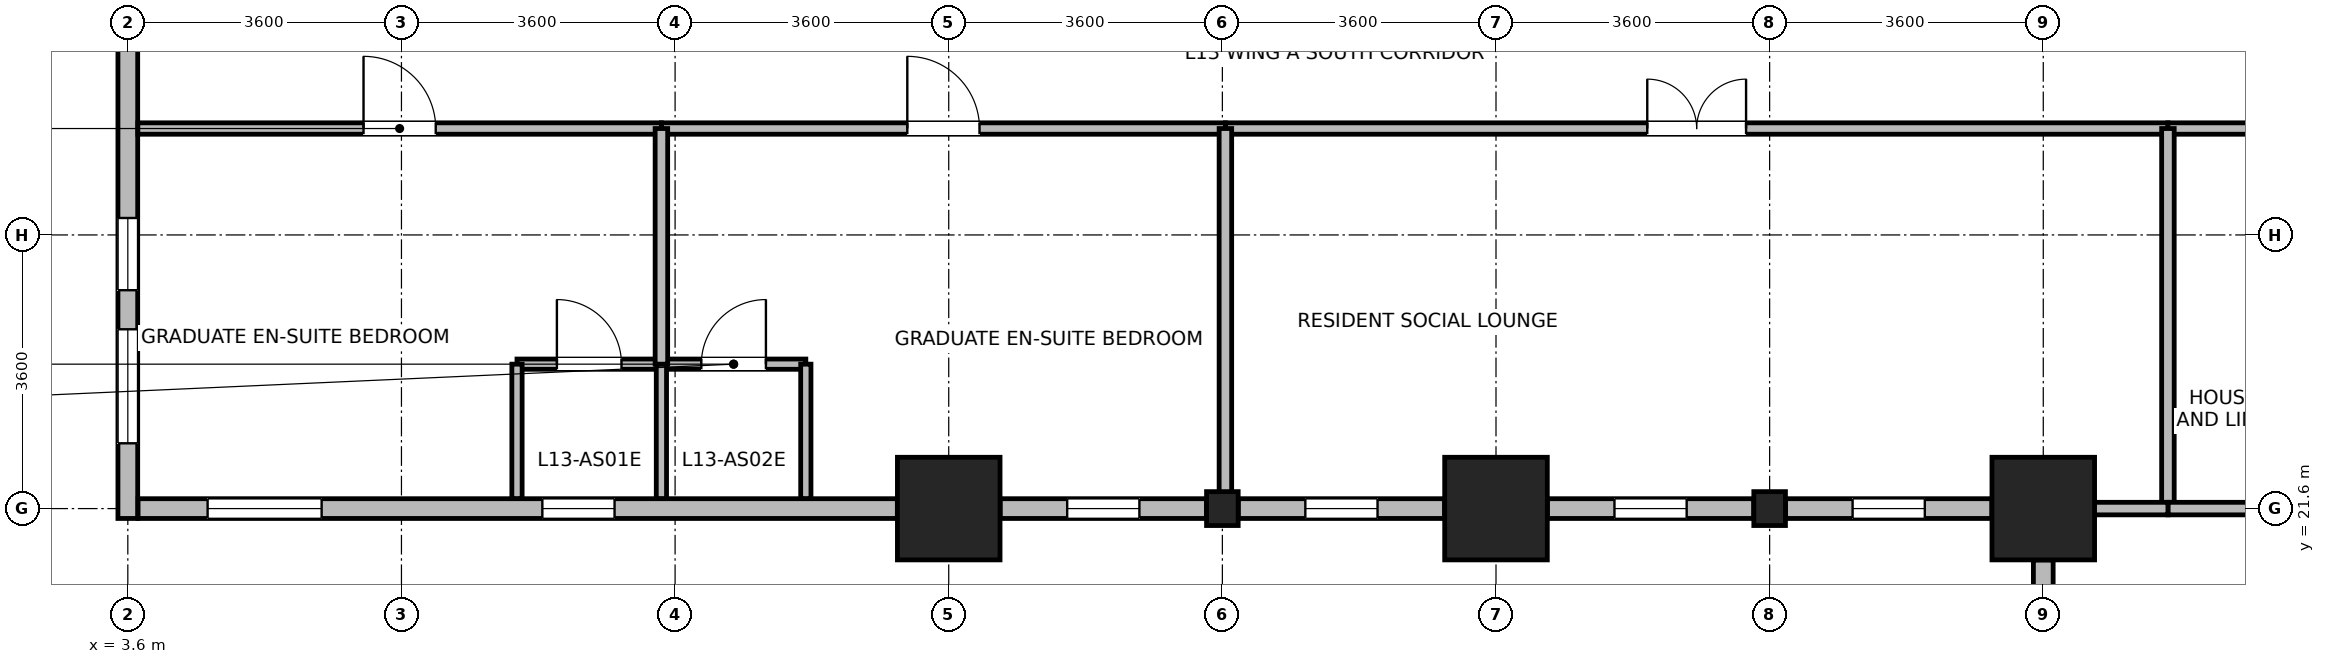
"""IFC4 building model, lengths in metres.
Left out: names, types, materials, properties, quantities, classifications, styles, units other than length and angle.
Written with IfcOpenShell. Run it as: python <this file> out.ifc"""

import sys

from ifc_helpers import new_model, si_unit, direction, frame, frame_2d, origin, origin_2d, place, context, subcontext, project, spatial, rectangle, i_section, extrude, source, transform, mapped, element, fill, save


model = new_model("IFC4")
c1 = context("Model", 3, precision=1e-05, world=origin(), true_north=direction((0.0, 1.0)))
c2 = subcontext(c1, "Body", "Model", "MODEL_VIEW")
j1 = project(units=[si_unit("LENGTHUNIT", "METRE"), si_unit("PLANEANGLEUNIT", "RADIAN")], contexts=[c1])
p1 = place(None, origin())
s1 = spatial("IfcSite", under=j1, at=p1, CompositionType="ELEMENT")
p2 = place(p1, origin())
s2 = spatial("IfcBuilding", under=s1, at=p2, CompositionType="ELEMENT")
p3 = place(p2, frame((0.0, 0.0, 54.9)))
s3 = spatial("IfcBuildingStorey", under=s2, at=p3, CompositionType="ELEMENT", Elevation=54.9)
m1 = source(origin(), c2, "Body", "SweptSolid", [
    extrude(rectangle(XDim=1.35, YDim=1.35, at=origin_2d()), origin(), (0.0, 0.0, 1.0), 3.7),
])
for number, where, z_axis, x_axis in (
    (1, (14.4, 21.6, 0.0), (0.0, 0.0, 1.0), (1.0, 0.0, 0.0)),
    (2, (21.6, 21.6, 0.0), (0.0, 0.0, 1.0), (1.0, 0.0, 0.0)),
    (3, (28.8, 21.6, 0.0), (0.0, 0.0, 1.0), (1.0, 0.0, 0.0)),
):
    element("IfcColumn", number, at=place(p3, frame(where, z_axis=z_axis, x_axis=x_axis)), inside=s3, PredefinedType="COLUMN", context=c2, shape_type="MappedRepresentation", body=[
        mapped(m1, transform((0.0, 0.0, 0.0), x_axis=(1.0, 0.0, 0.0), y_axis=(0.0, 1.0, 0.0), z_axis=(0.0, 0.0, 1.0), scale=1.0)),
    ])
m2 = source(origin(), c2, "Body", "SweptSolid", [
    extrude(i_section(OverallWidth=0.416, OverallDepth=0.446, WebThickness=0.029, FlangeThickness=0.04, FilletRadius=0.015, at=origin_2d()), origin(), (0.0, 0.0, 1.0), 3.7),
])
for number, where, z_axis, x_axis in (
    (4, (18.0, 21.6, 0.0), (0.0, 0.0, 1.0), (1.0, 0.0, 0.0)),
    (5, (25.2, 21.6, 0.0), (0.0, 0.0, 1.0), (1.0, 0.0, 0.0)),
):
    element("IfcColumn", number, at=place(p3, frame(where, z_axis=z_axis, x_axis=x_axis)), inside=s3, PredefinedType="COLUMN", context=c2, shape_type="MappedRepresentation", body=[
        mapped(m2, transform((0.0, 0.0, 0.0), x_axis=(1.0, 0.0, 0.0), y_axis=(0.0, 1.0, 0.0), z_axis=(0.0, 0.0, 1.0), scale=1.0)),
    ])
p4 = place(p3, frame((3.6, 21.47, 0.0), z_axis=(0.0, 0.0, 1.0), x_axis=(0.0, 1.0, 0.0)))
e6 = element("IfcWall", 6, at=p4, inside=s3, PredefinedType="STANDARD", context=c2, shape_type="SweptSolid", body=[
    extrude(rectangle(XDim=6.956, YDim=0.26, at=frame_2d((3.478, 0.0))), origin(), (0.0, 0.0, 1.0), 3.43),
])
p5 = place(p4, frame((0.989, 0.0, 0.85)))
e7 = element("IfcOpeningElement", 7, at=p5, cuts=e6, PredefinedType="OPENING", context=c2, shape_type="SweptSolid", body=[
    extrude(rectangle(XDim=1.5, YDim=1.85, at=frame_2d((0.75, 0.925))), frame((0.0, 0.14, 0.0), z_axis=(0.0, -1.0, 0.0), x_axis=(1.0, 0.0, 0.0)), (0.0, 0.0, 1.0), 0.28),
])
p6 = place(p4, frame((3.003, 0.0, 0.85)))
e8 = element("IfcOpeningElement", 8, at=p6, cuts=e6, PredefinedType="OPENING", context=c2, shape_type="SweptSolid", body=[
    extrude(rectangle(XDim=0.95, YDim=1.75, at=frame_2d((0.475, 0.875))), frame((0.0, 0.14, 0.0), z_axis=(0.0, -1.0, 0.0), x_axis=(1.0, 0.0, 0.0)), (0.0, 0.0, 1.0), 0.28),
])
p7 = place(p3, frame((13.724, 21.6, 0.0), z_axis=(0.0, 0.0, 1.0), x_axis=(-1.0, 0.0, 0.0)))
e9 = element("IfcWall", 9, at=p7, inside=s3, PredefinedType="STANDARD", context=c2, shape_type="SweptSolid", body=[
    extrude(rectangle(XDim=9.989, YDim=0.26, at=frame_2d((4.995, 0.0))), origin(), (0.0, 0.0, 1.0), 3.43),
])
p8 = place(p7, frame((7.574, 0.0, 0.85)))
e10 = element("IfcOpeningElement", 10, at=p8, cuts=e9, PredefinedType="OPENING", context=c2, shape_type="SweptSolid", body=[
    extrude(rectangle(XDim=1.5, YDim=1.85, at=frame_2d((0.75, 0.925))), frame((0.0, 0.14, 0.0), z_axis=(0.0, -1.0, 0.0), x_axis=(1.0, 0.0, 0.0)), (0.0, 0.0, 1.0), 0.28),
])
p9 = place(p7, frame((3.72, 0.0, 0.85)))
e11 = element("IfcOpeningElement", 11, at=p9, cuts=e9, PredefinedType="OPENING", context=c2, shape_type="SweptSolid", body=[
    extrude(rectangle(XDim=0.95, YDim=1.75, at=frame_2d((0.475, 0.875))), frame((0.0, 0.14, 0.0), z_axis=(0.0, -1.0, 0.0), x_axis=(1.0, 0.0, 0.0)), (0.0, 0.0, 1.0), 0.28),
])
p10 = place(p3, frame((17.791, 21.6, 0.0), z_axis=(0.0, 0.0, 1.0), x_axis=(-1.0, 0.0, 0.0)))
e12 = element("IfcWall", 12, at=p10, inside=s3, PredefinedType="STANDARD", context=c2, shape_type="SweptSolid", body=[
    extrude(rectangle(XDim=2.715, YDim=0.26, at=frame_2d((1.357, 0.0))), origin(), (0.0, 0.0, 1.0), 2.93),
])
p11 = place(p10, frame((0.883, 0.0, 0.85)))
e13 = element("IfcOpeningElement", 13, at=p11, cuts=e12, PredefinedType="OPENING", context=c2, shape_type="SweptSolid", body=[
    extrude(rectangle(XDim=0.95, YDim=1.75, at=frame_2d((0.475, 0.875))), frame((0.0, 0.14, 0.0), z_axis=(0.0, -1.0, 0.0), x_axis=(1.0, 0.0, 0.0)), (0.0, 0.0, 1.0), 0.28),
])
p12 = place(p3, frame((20.924, 21.6, 0.0), z_axis=(0.0, 0.0, 1.0), x_axis=(-1.0, 0.0, 0.0)))
e14 = element("IfcWall", 14, at=p12, inside=s3, PredefinedType="STANDARD", context=c2, shape_type="SweptSolid", body=[
    extrude(rectangle(XDim=2.715, YDim=0.26, at=frame_2d((1.357, 0.0))), origin(), (0.0, 0.0, 1.0), 2.93),
])
p13 = place(p12, frame((0.883, 0.0, 0.85)))
e15 = element("IfcOpeningElement", 15, at=p13, cuts=e14, PredefinedType="OPENING", context=c2, shape_type="SweptSolid", body=[
    extrude(rectangle(XDim=0.95, YDim=1.75, at=frame_2d((0.475, 0.875))), frame((0.0, 0.14, 0.0), z_axis=(0.0, -1.0, 0.0), x_axis=(1.0, 0.0, 0.0)), (0.0, 0.0, 1.0), 0.28),
])
p14 = place(p3, frame((24.991, 21.6, 0.0), z_axis=(0.0, 0.0, 1.0), x_axis=(-1.0, 0.0, 0.0)))
e16 = element("IfcWall", 16, at=p14, inside=s3, PredefinedType="STANDARD", context=c2, shape_type="SweptSolid", body=[
    extrude(rectangle(XDim=2.715, YDim=0.26, at=frame_2d((1.357, 0.0))), origin(), (0.0, 0.0, 1.0), 2.93),
])
p15 = place(p14, frame((0.883, 0.0, 0.85)))
e17 = element("IfcOpeningElement", 17, at=p15, cuts=e16, PredefinedType="OPENING", context=c2, shape_type="SweptSolid", body=[
    extrude(rectangle(XDim=0.95, YDim=1.75, at=frame_2d((0.475, 0.875))), frame((0.0, 0.14, 0.0), z_axis=(0.0, -1.0, 0.0), x_axis=(1.0, 0.0, 0.0)), (0.0, 0.0, 1.0), 0.28),
])
p16 = place(p3, frame((28.124, 21.6, 0.0), z_axis=(0.0, 0.0, 1.0), x_axis=(-1.0, 0.0, 0.0)))
e18 = element("IfcWall", 18, at=p16, inside=s3, PredefinedType="STANDARD", context=c2, shape_type="SweptSolid", body=[
    extrude(rectangle(XDim=2.715, YDim=0.26, at=frame_2d((1.357, 0.0))), origin(), (0.0, 0.0, 1.0), 2.93),
])
p17 = place(p16, frame((0.883, 0.0, 0.85)))
e19 = element("IfcOpeningElement", 19, at=p17, cuts=e18, PredefinedType="OPENING", context=c2, shape_type="SweptSolid", body=[
    extrude(rectangle(XDim=0.95, YDim=1.75, at=frame_2d((0.475, 0.875))), frame((0.0, 0.14, 0.0), z_axis=(0.0, -1.0, 0.0), x_axis=(1.0, 0.0, 0.0)), (0.0, 0.0, 1.0), 0.28),
])
p18 = place(p3, frame((28.8, 1.67, 0.0), z_axis=(0.0, 0.0, 1.0), x_axis=(0.0, 1.0, 0.0)))
e20 = element("IfcWall", 20, at=p18, inside=s3, PredefinedType="STANDARD", context=c2, shape_type="SweptSolid", body=[
    extrude(rectangle(XDim=19.254, YDim=0.26, at=frame_2d((9.627, 0.0))), origin(), (0.0, 0.0, 1.0), 3.43),
])
p19 = place(p18, frame((0.854, 0.0, 0.85)))
e21 = element("IfcOpeningElement", 21, at=p19, cuts=e20, PredefinedType="OPENING", context=c2, shape_type="SweptSolid", body=[
    extrude(rectangle(XDim=1.5, YDim=1.85, at=frame_2d((0.75, 0.925))), frame((0.0, 0.14, 0.0), z_axis=(0.0, -1.0, 0.0), x_axis=(1.0, 0.0, 0.0)), (0.0, 0.0, 1.0), 0.28),
])
p20 = place(p18, frame((7.272, 0.0, 0.85)))
e22 = element("IfcOpeningElement", 22, at=p20, cuts=e20, PredefinedType="OPENING", context=c2, shape_type="SweptSolid", body=[
    extrude(rectangle(XDim=1.5, YDim=1.85, at=frame_2d((0.75, 0.925))), frame((0.0, 0.14, 0.0), z_axis=(0.0, -1.0, 0.0), x_axis=(1.0, 0.0, 0.0)), (0.0, 0.0, 1.0), 0.28),
])
p21 = place(p18, frame((10.481, 0.0, 0.85)))
e23 = element("IfcOpeningElement", 23, at=p21, cuts=e20, PredefinedType="OPENING", context=c2, shape_type="SweptSolid", body=[
    extrude(rectangle(XDim=1.5, YDim=1.85, at=frame_2d((0.75, 0.925))), frame((0.0, 0.14, 0.0), z_axis=(0.0, -1.0, 0.0), x_axis=(1.0, 0.0, 0.0)), (0.0, 0.0, 1.0), 0.28),
])
p22 = place(p18, frame((13.69, 0.0, 0.85)))
e24 = element("IfcOpeningElement", 24, at=p22, cuts=e20, PredefinedType="OPENING", context=c2, shape_type="SweptSolid", body=[
    extrude(rectangle(XDim=1.5, YDim=1.85, at=frame_2d((0.75, 0.925))), frame((0.0, 0.14, 0.0), z_axis=(0.0, -1.0, 0.0), x_axis=(1.0, 0.0, 0.0)), (0.0, 0.0, 1.0), 0.28),
])
p23 = place(p18, frame((16.899, 0.0, 0.85)))
e25 = element("IfcOpeningElement", 25, at=p23, cuts=e20, PredefinedType="OPENING", context=c2, shape_type="SweptSolid", body=[
    extrude(rectangle(XDim=1.5, YDim=1.85, at=frame_2d((0.75, 0.925))), frame((0.0, 0.14, 0.0), z_axis=(0.0, -1.0, 0.0), x_axis=(1.0, 0.0, 0.0)), (0.0, 0.0, 1.0), 0.28),
])
p24 = place(p3, frame((10.62, 23.5, 0.0), z_axis=(0.0, 0.0, 1.0), x_axis=(1.0, 0.0, 0.0)))
e26 = element("IfcWall", 26, at=p24, inside=s3, PredefinedType="PARTITIONING", context=c2, shape_type="SweptSolid", body=[
    extrude(rectangle(XDim=1.9, YDim=0.135, at=frame_2d((0.95, 0.0))), origin(), (0.0, 0.0, 1.0), 3.43),
])
p25 = place(p24, frame((0.525, 0.0, 0.0)))
e27 = element("IfcOpeningElement", 27, at=p25, cuts=e26, PredefinedType="OPENING", context=c2, shape_type="SweptSolid", body=[
    extrude(rectangle(XDim=0.85, YDim=2.04, at=frame_2d((0.425, 1.02))), frame((0.0, 0.078, 0.0), z_axis=(0.0, -1.0, 0.0), x_axis=(1.0, 0.0, 0.0)), (0.0, 0.0, 1.0), 0.155),
])
p26 = place(p3, frame((8.72, 23.5, 0.0), z_axis=(0.0, 0.0, 1.0), x_axis=(1.0, 0.0, 0.0)))
e28 = element("IfcWall", 28, at=p26, inside=s3, PredefinedType="PARTITIONING", context=c2, shape_type="SweptSolid", body=[
    extrude(rectangle(XDim=1.9, YDim=0.135, at=frame_2d((0.95, 0.0))), origin(), (0.0, 0.0, 1.0), 3.43),
])
p27 = place(p26, frame((0.525, 0.0, 0.0)))
e29 = element("IfcOpeningElement", 29, at=p27, cuts=e28, PredefinedType="OPENING", context=c2, shape_type="SweptSolid", body=[
    extrude(rectangle(XDim=0.85, YDim=2.04, at=frame_2d((0.425, 1.02))), frame((0.0, 0.078, 0.0), z_axis=(0.0, -1.0, 0.0), x_axis=(1.0, 0.0, 0.0)), (0.0, 0.0, 1.0), 0.155),
])
for number, where, z_axis, x_axis in (
    (30, (8.72, 21.732, 0.0), (0.0, 0.0, 1.0), (0.0, 1.0, 0.0)),
    (31, (10.62, 21.732, 0.0), (0.0, 0.0, 1.0), (0.0, 1.0, 0.0)),
    (32, (12.52, 21.732, 0.0), (0.0, 0.0, 1.0), (0.0, 1.0, 0.0)),
):
    element("IfcWall", number, at=place(p3, frame(where, z_axis=z_axis, x_axis=x_axis)), inside=s3, PredefinedType="PARTITIONING", context=c2, shape_type="SweptSolid", body=[
        extrude(rectangle(XDim=1.768, YDim=0.135, at=frame_2d((0.884, 0.0))), origin(), (0.0, 0.0, 1.0), 3.43),
    ])
p28 = place(p3, frame((18.04, 26.6, 0.0), z_axis=(0.0, 0.0, 1.0), x_axis=(1.0, 0.0, 0.0)))
e33 = element("IfcWall", 33, at=p28, inside=s3, PredefinedType="PARTITIONING", context=c2, shape_type="SweptSolid", body=[
    extrude(rectangle(XDim=12.4, YDim=0.15, at=frame_2d((6.2, 0.0))), origin(), (0.0, 0.0, 1.0), 3.43),
])
p29 = place(p28, frame((5.55, 0.0, 0.0)))
e34 = element("IfcOpeningElement", 34, at=p29, cuts=e33, PredefinedType="OPENING", context=c2, shape_type="SweptSolid", body=[
    extrude(rectangle(XDim=1.3, YDim=2.12, at=frame_2d((0.65, 1.06))), frame((0.0, 0.085, 0.0), z_axis=(0.0, -1.0, 0.0), x_axis=(1.0, 0.0, 0.0)), (0.0, 0.0, 1.0), 0.17),
])
p30 = place(p3, frame((10.62, 26.6, 0.0), z_axis=(0.0, 0.0, 1.0), x_axis=(1.0, 0.0, 0.0)))
e35 = element("IfcWall", 35, at=p30, inside=s3, PredefinedType="PARTITIONING", context=c2, shape_type="SweptSolid", body=[
    extrude(rectangle(XDim=7.42, YDim=0.15, at=frame_2d((3.71, 0.0))), origin(), (0.0, 0.0, 1.0), 3.43),
])
p31 = place(p30, frame((3.235, 0.0, 0.0)))
e36 = element("IfcOpeningElement", 36, at=p31, cuts=e35, PredefinedType="OPENING", context=c2, shape_type="SweptSolid", body=[
    extrude(rectangle(XDim=0.95, YDim=2.1, at=frame_2d((0.475, 1.05))), frame((0.0, 0.085, 0.0), z_axis=(0.0, -1.0, 0.0), x_axis=(1.0, 0.0, 0.0)), (0.0, 0.0, 1.0), 0.17),
])
p32 = place(p3, frame((3.732, 26.6, 0.0), z_axis=(0.0, 0.0, 1.0), x_axis=(1.0, 0.0, 0.0)))
e37 = element("IfcWall", 37, at=p32, inside=s3, PredefinedType="PARTITIONING", context=c2, shape_type="SweptSolid", body=[
    extrude(rectangle(XDim=6.888, YDim=0.15, at=frame_2d((3.444, 0.0))), origin(), (0.0, 0.0, 1.0), 3.43),
])
p33 = place(p32, frame((2.969, 0.0, 0.0)))
e38 = element("IfcOpeningElement", 38, at=p33, cuts=e37, PredefinedType="OPENING", context=c2, shape_type="SweptSolid", body=[
    extrude(rectangle(XDim=0.95, YDim=2.1, at=frame_2d((0.475, 1.05))), frame((0.0, 0.085, 0.0), z_axis=(0.0, -1.0, 0.0), x_axis=(1.0, 0.0, 0.0)), (0.0, 0.0, 1.0), 0.17),
])
p34 = place(p3, frame((30.44, 26.6, 0.0), z_axis=(0.0, 0.0, 1.0), x_axis=(1.0, 0.0, 0.0)))
e39 = element("IfcWall", 39, at=p34, inside=s3, PredefinedType="PARTITIONING", context=c2, shape_type="SweptSolid", body=[
    extrude(rectangle(XDim=2.92, YDim=0.15, at=frame_2d((1.46, 0.0))), origin(), (0.0, 0.0, 1.0), 3.43),
])
p35 = place(p3, frame((18.04, 21.732, 0.0), z_axis=(0.0, 0.0, 1.0), x_axis=(0.0, 1.0, 0.0)))
e40 = element("IfcWall", 40, at=p35, inside=s3, PredefinedType="PARTITIONING", context=c2, shape_type="SweptSolid", body=[
    extrude(rectangle(XDim=4.868, YDim=0.165, at=frame_2d((2.434, 0.0))), origin(), (0.0, 0.0, 1.0), 3.07),
])
p36 = place(p3, frame((30.44, 21.6, 0.0), z_axis=(0.0, 0.0, 1.0), x_axis=(0.0, 1.0, 0.0)))
e41 = element("IfcWall", 41, at=p36, inside=s3, PredefinedType="PARTITIONING", context=c2, shape_type="SweptSolid", body=[
    extrude(rectangle(XDim=5.0, YDim=0.165, at=frame_2d((2.5, 0.0))), origin(), (0.0, 0.0, 1.0), 3.43),
])
p37 = place(p3, frame((10.62, 23.5, 0.0), z_axis=(0.0, 0.0, 1.0), x_axis=(0.0, 1.0, 0.0)))
e42 = element("IfcWall", 42, at=p37, inside=s3, PredefinedType="PARTITIONING", context=c2, shape_type="SweptSolid", body=[
    extrude(rectangle(XDim=3.1, YDim=0.165, at=frame_2d((1.55, 0.0))), origin(), (0.0, 0.0, 1.0), 3.43),
])
p38 = place(p3, frame((30.44, 21.6, 0.0), z_axis=(0.0, 0.0, 1.0), x_axis=(1.0, 0.0, 0.0)))
e43 = element("IfcWall", 43, at=p38, inside=s3, PredefinedType="PARTITIONING", context=c2, shape_type="SweptSolid", body=[
    extrude(rectangle(XDim=2.92, YDim=0.165, at=frame_2d((1.46, 0.0))), origin(), (0.0, 0.0, 1.0), 2.93),
])
p39 = place(p3, frame((28.932, 21.6, 0.0), z_axis=(0.0, 0.0, 1.0), x_axis=(1.0, 0.0, 0.0)))
e44 = element("IfcWall", 44, at=p39, inside=s3, PredefinedType="PARTITIONING", context=c2, shape_type="SweptSolid", body=[
    extrude(rectangle(XDim=1.508, YDim=0.165, at=frame_2d((0.754, 0.0))), origin(), (0.0, 0.0, 1.0), 2.93),
])
p40 = place(p5, origin())
e45 = element("IfcWindow", 45, at=p40, inside=s3, PartitioningType="SINGLE_PANEL", PredefinedType="WINDOW", context=c2, shape_type="SweptSolid", body=[
    extrude(rectangle(XDim=1.5, YDim=1.85, at=frame_2d((0.75, 0.925))), frame((0.0, 0.03, 0.0), z_axis=(0.0, -1.0, 0.0), x_axis=(1.0, 0.0, 0.0)), (0.0, 0.0, 1.0), 0.06),
])
fill(e7, e45)
p41 = place(p6, origin())
e46 = element("IfcWindow", 46, at=p41, inside=s3, PartitioningType="SINGLE_PANEL", PredefinedType="WINDOW", context=c2, shape_type="SweptSolid", body=[
    extrude(rectangle(XDim=0.95, YDim=1.75, at=frame_2d((0.475, 0.875))), frame((0.0, 0.03, 0.0), z_axis=(0.0, -1.0, 0.0), x_axis=(1.0, 0.0, 0.0)), (0.0, 0.0, 1.0), 0.06),
])
fill(e8, e46)
p42 = place(p8, origin())
e47 = element("IfcWindow", 47, at=p42, inside=s3, PartitioningType="SINGLE_PANEL", PredefinedType="WINDOW", context=c2, shape_type="SweptSolid", body=[
    extrude(rectangle(XDim=1.5, YDim=1.85, at=frame_2d((0.75, 0.925))), frame((0.0, 0.03, 0.0), z_axis=(0.0, -1.0, 0.0), x_axis=(1.0, 0.0, 0.0)), (0.0, 0.0, 1.0), 0.06),
])
fill(e10, e47)
p43 = place(p9, origin())
e48 = element("IfcWindow", 48, at=p43, inside=s3, PartitioningType="SINGLE_PANEL", PredefinedType="WINDOW", context=c2, shape_type="SweptSolid", body=[
    extrude(rectangle(XDim=0.95, YDim=1.75, at=frame_2d((0.475, 0.875))), frame((0.0, 0.03, 0.0), z_axis=(0.0, -1.0, 0.0), x_axis=(1.0, 0.0, 0.0)), (0.0, 0.0, 1.0), 0.06),
])
fill(e11, e48)
p44 = place(p11, origin())
e49 = element("IfcWindow", 49, at=p44, inside=s3, PartitioningType="SINGLE_PANEL", PredefinedType="WINDOW", context=c2, shape_type="SweptSolid", body=[
    extrude(rectangle(XDim=0.95, YDim=1.75, at=frame_2d((0.475, 0.875))), frame((0.0, 0.03, 0.0), z_axis=(0.0, -1.0, 0.0), x_axis=(1.0, 0.0, 0.0)), (0.0, 0.0, 1.0), 0.06),
])
fill(e13, e49)
p45 = place(p13, origin())
e50 = element("IfcWindow", 50, at=p45, inside=s3, PartitioningType="SINGLE_PANEL", PredefinedType="WINDOW", context=c2, shape_type="SweptSolid", body=[
    extrude(rectangle(XDim=0.95, YDim=1.75, at=frame_2d((0.475, 0.875))), frame((0.0, 0.03, 0.0), z_axis=(0.0, -1.0, 0.0), x_axis=(1.0, 0.0, 0.0)), (0.0, 0.0, 1.0), 0.06),
])
fill(e15, e50)
p46 = place(p15, origin())
e51 = element("IfcWindow", 51, at=p46, inside=s3, PartitioningType="SINGLE_PANEL", PredefinedType="WINDOW", context=c2, shape_type="SweptSolid", body=[
    extrude(rectangle(XDim=0.95, YDim=1.75, at=frame_2d((0.475, 0.875))), frame((0.0, 0.03, 0.0), z_axis=(0.0, -1.0, 0.0), x_axis=(1.0, 0.0, 0.0)), (0.0, 0.0, 1.0), 0.06),
])
fill(e17, e51)
p47 = place(p17, origin())
e52 = element("IfcWindow", 52, at=p47, inside=s3, PartitioningType="SINGLE_PANEL", PredefinedType="WINDOW", context=c2, shape_type="SweptSolid", body=[
    extrude(rectangle(XDim=0.95, YDim=1.75, at=frame_2d((0.475, 0.875))), frame((0.0, 0.03, 0.0), z_axis=(0.0, -1.0, 0.0), x_axis=(1.0, 0.0, 0.0)), (0.0, 0.0, 1.0), 0.06),
])
fill(e19, e52)
p48 = place(p25, origin())
e53 = element("IfcDoor", 53, at=p48, inside=s3, OperationType="SINGLE_SWING_RIGHT", PredefinedType="DOOR", context=c2, shape_type="SweptSolid", body=[
    extrude(rectangle(XDim=0.85, YDim=2.04, at=frame_2d((0.425, 1.02))), frame((0.0, 0.025, 0.0), z_axis=(0.0, -1.0, 0.0), x_axis=(1.0, 0.0, 0.0)), (0.0, 0.0, 1.0), 0.05),
])
fill(e27, e53)
p49 = place(p27, origin())
e54 = element("IfcDoor", 54, at=p49, inside=s3, OperationType="SINGLE_SWING_LEFT", PredefinedType="DOOR", context=c2, shape_type="SweptSolid", body=[
    extrude(rectangle(XDim=0.85, YDim=2.04, at=frame_2d((0.425, 1.02))), frame((0.0, 0.025, 0.0), z_axis=(0.0, -1.0, 0.0), x_axis=(1.0, 0.0, 0.0)), (0.0, 0.0, 1.0), 0.05),
])
fill(e29, e54)
p50 = place(p29, origin())
e55 = element("IfcDoor", 55, at=p50, inside=s3, OperationType="DOUBLE_DOOR_SINGLE_SWING", PredefinedType="DOOR", context=c2, shape_type="SweptSolid", body=[
    extrude(rectangle(XDim=1.3, YDim=2.12, at=frame_2d((0.65, 1.06))), frame((0.0, 0.025, 0.0), z_axis=(0.0, -1.0, 0.0), x_axis=(1.0, 0.0, 0.0)), (0.0, 0.0, 1.0), 0.05),
])
fill(e34, e55)
p51 = place(p31, origin())
e56 = element("IfcDoor", 56, at=p51, inside=s3, OperationType="SINGLE_SWING_LEFT", PredefinedType="DOOR", context=c2, shape_type="SweptSolid", body=[
    extrude(rectangle(XDim=0.95, YDim=2.1, at=frame_2d((0.475, 1.05))), frame((0.0, 0.025, 0.0), z_axis=(0.0, -1.0, 0.0), x_axis=(1.0, 0.0, 0.0)), (0.0, 0.0, 1.0), 0.05),
])
fill(e36, e56)
p52 = place(p33, origin())
e57 = element("IfcDoor", 57, at=p52, inside=s3, OperationType="SINGLE_SWING_LEFT", PredefinedType="DOOR", context=c2, shape_type="SweptSolid", body=[
    extrude(rectangle(XDim=0.95, YDim=2.1, at=frame_2d((0.475, 1.05))), frame((0.0, 0.025, 0.0), z_axis=(0.0, -1.0, 0.0), x_axis=(1.0, 0.0, 0.0)), (0.0, 0.0, 1.0), 0.05),
])
fill(e38, e57)
save(model, sys.argv[1])
